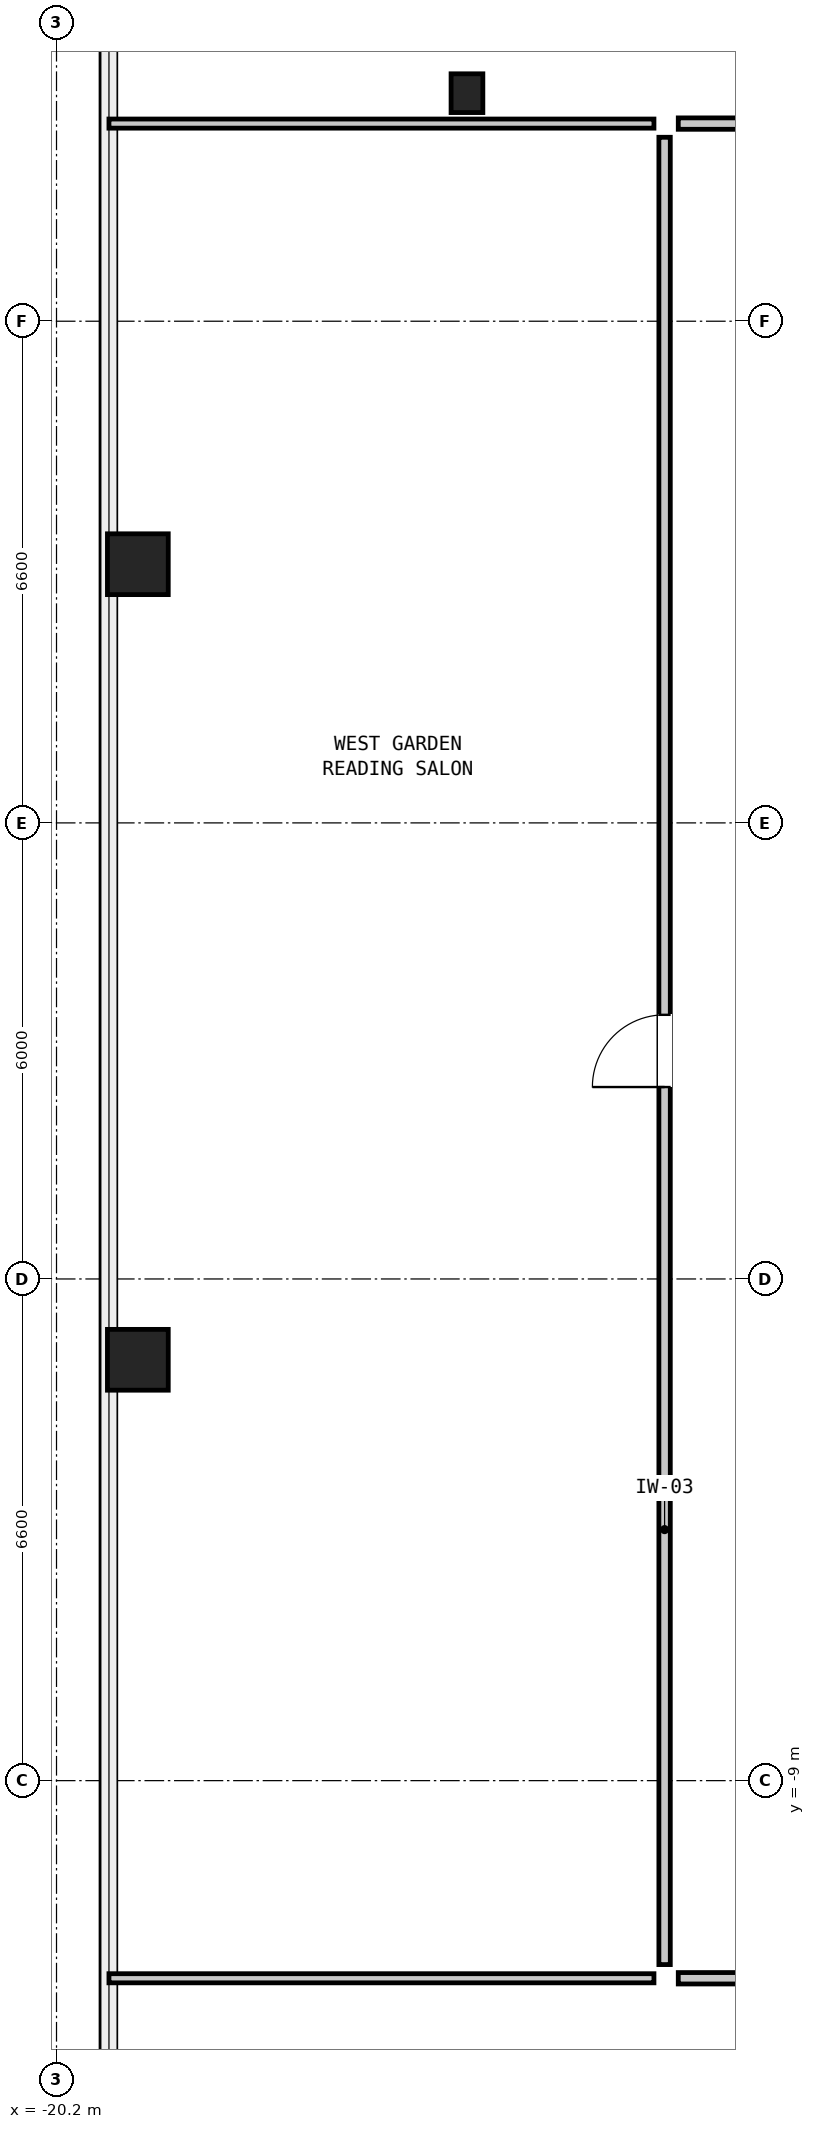
"""IFC4 building model, lengths in metres.
Left out: names, types, materials, properties, quantities, classifications, styles, units other than length and angle.
Written with IfcOpenShell. Run it as: python <this file> out.ifc"""

import sys

from ifc_helpers import new_model, si_unit, direction, frame, frame_2d, origin, origin_2d, place, context, subcontext, project, spatial, rectangle, hollow_rectangle, i_section, extrude, element, fill, save


model = new_model("IFC4")
c1 = context("Model", 3, precision=1e-05, world=origin(), true_north=direction((0.0, 1.0)))
c2 = subcontext(c1, "Body", "Model", "MODEL_VIEW")
j1 = project(units=[si_unit("LENGTHUNIT", "METRE"), si_unit("PLANEANGLEUNIT", "RADIAN")], contexts=[c1])
p1 = place(None, origin())
s1 = spatial("IfcSite", under=j1, at=p1, CompositionType="ELEMENT")
p2 = place(p1, origin())
s2 = spatial("IfcBuilding", under=s1, at=p2, CompositionType="ELEMENT")
p3 = place(p2, frame((0.0, 0.0, 61.5)))
s3 = spatial("IfcBuildingStorey", under=s2, at=p3, CompositionType="ELEMENT", Elevation=61.5)
for number, where, z_axis, x_axis in (
    (1, (-19.13, 7.003, 0.0), (0.0, 0.0, 1.0), (0.0, 1.0, 0.0)),
    (2, (-19.13, -3.463, 0.0), (0.0, 0.0, 1.0), (0.0, 1.0, 0.0)),
):
    element("IfcColumn", number, at=place(p3, frame(where, z_axis=z_axis, x_axis=x_axis)), inside=s3, PredefinedType="COLUMN", context=c2, shape_type="SweptSolid", body=[
        extrude(hollow_rectangle(XDim=0.8, YDim=0.8, WallThickness=0.05, at=origin_2d()), origin(), (0.0, 0.0, 1.0), 3.6),
    ])
p4 = place(p3, frame((-14.8, 13.2, 0.0), z_axis=(0.0, 0.0, 1.0), x_axis=(1.0, 0.0, 0.0)))
e3 = element("IfcColumn", 3, at=p4, inside=s3, PredefinedType="COLUMN", context=c2, shape_type="SweptSolid", body=[
    extrude(i_section(OverallWidth=0.418, OverallDepth=0.51, WebThickness=0.042, FlangeThickness=0.068, at=origin_2d()), origin(), (0.0, 0.0, 1.0), 3.6),
])
p5 = place(p3, frame((-19.51, 12.8, 0.0), z_axis=(0.0, 0.0, 1.0), x_axis=(1.0, 0.0, 0.0)))
e4 = element("IfcWall", 4, at=p5, inside=s3, PredefinedType="PARTITIONING", context=c2, shape_type="SweptSolid", body=[
    extrude(rectangle(XDim=7.17, YDim=0.12, at=frame_2d((3.585, 0.0))), origin(), (0.0, 0.0, 1.0), 3.22),
])
p6 = place(p3, frame((-19.51, -11.6, 0.0), z_axis=(0.0, 0.0, 1.0), x_axis=(1.0, 0.0, 0.0)))
e5 = element("IfcWall", 5, at=p6, inside=s3, PredefinedType="PARTITIONING", context=c2, shape_type="SweptSolid", body=[
    extrude(rectangle(XDim=7.17, YDim=0.12, at=frame_2d((3.585, 0.0))), origin(), (0.0, 0.0, 1.0), 2.438),
])
p7 = place(p3, frame((-12.02, 12.8, 0.0), z_axis=(0.0, 0.0, 1.0), x_axis=(1.0, 0.0, 0.0)))
e6 = element("IfcWall", 6, at=p7, inside=s3, PredefinedType="PARTITIONING", context=c2, shape_type="SweptSolid", body=[
    extrude(rectangle(XDim=7.34, YDim=0.15, at=frame_2d((3.67, 0.0))), origin(), (0.0, 0.0, 1.0), 3.22),
])
p8 = place(p7, frame((3.195, 0.0, 0.0)))
e7 = element("IfcOpeningElement", 7, at=p8, cuts=e6, PredefinedType="OPENING", context=c2, shape_type="SweptSolid", body=[
    extrude(rectangle(XDim=0.95, YDim=2.1, at=frame_2d((0.475, 1.05))), frame((0.0, 0.087, 0.0), z_axis=(0.0, -1.0, 0.0), x_axis=(1.0, 0.0, 0.0)), (0.0, 0.0, 1.0), 0.174),
])
p9 = place(p3, frame((-12.02, -11.6, 0.0), z_axis=(0.0, 0.0, 1.0), x_axis=(1.0, 0.0, 0.0)))
e8 = element("IfcWall", 8, at=p9, inside=s3, PredefinedType="PARTITIONING", context=c2, shape_type="SweptSolid", body=[
    extrude(rectangle(XDim=7.64, YDim=0.15, at=frame_2d((3.82, 0.0))), origin(), (0.0, 0.0, 1.0), 2.438),
])
p10 = place(p9, frame((3.345, 0.0, 0.0)))
e9 = element("IfcOpeningElement", 9, at=p10, cuts=e8, PredefinedType="OPENING", context=c2, shape_type="SweptSolid", body=[
    extrude(rectangle(XDim=0.95, YDim=2.1, at=frame_2d((0.475, 1.05))), frame((0.0, 0.087, 0.0), z_axis=(0.0, -1.0, 0.0), x_axis=(1.0, 0.0, 0.0)), (0.0, 0.0, 1.0), 0.174),
])
p11 = place(p3, frame((-12.2, -11.42, 0.0), z_axis=(0.0, 0.0, 1.0), x_axis=(0.0, 1.0, 0.0)))
e10 = element("IfcWall", 10, at=p11, inside=s3, PredefinedType="PARTITIONING", context=c2, shape_type="SweptSolid", body=[
    extrude(rectangle(XDim=24.04, YDim=0.15, at=frame_2d((12.02, 0.0))), origin(), (0.0, 0.0, 1.0), 3.22),
])
p12 = place(p11, frame((11.545, 0.0, 0.0)))
e11 = element("IfcOpeningElement", 11, at=p12, cuts=e10, PredefinedType="OPENING", context=c2, shape_type="SweptSolid", body=[
    extrude(rectangle(XDim=0.95, YDim=2.1, at=frame_2d((0.475, 1.05))), frame((0.0, 0.087, 0.0), z_axis=(0.0, -1.0, 0.0), x_axis=(1.0, 0.0, 0.0)), (0.0, 0.0, 1.0), 0.174),
])
p13 = place(p12, origin())
e12 = element("IfcDoor", 12, at=p13, inside=s3, OperationType="SINGLE_SWING_LEFT", PredefinedType="DOOR", context=c2, shape_type="SweptSolid", body=[
    extrude(rectangle(XDim=0.95, YDim=2.1, at=frame_2d((0.475, 1.05))), frame((0.0, 0.025, 0.0), z_axis=(0.0, -1.0, 0.0), x_axis=(1.0, 0.0, 0.0)), (0.0, 0.0, 1.0), 0.05),
])
fill(e11, e12)
save(model, sys.argv[1])
